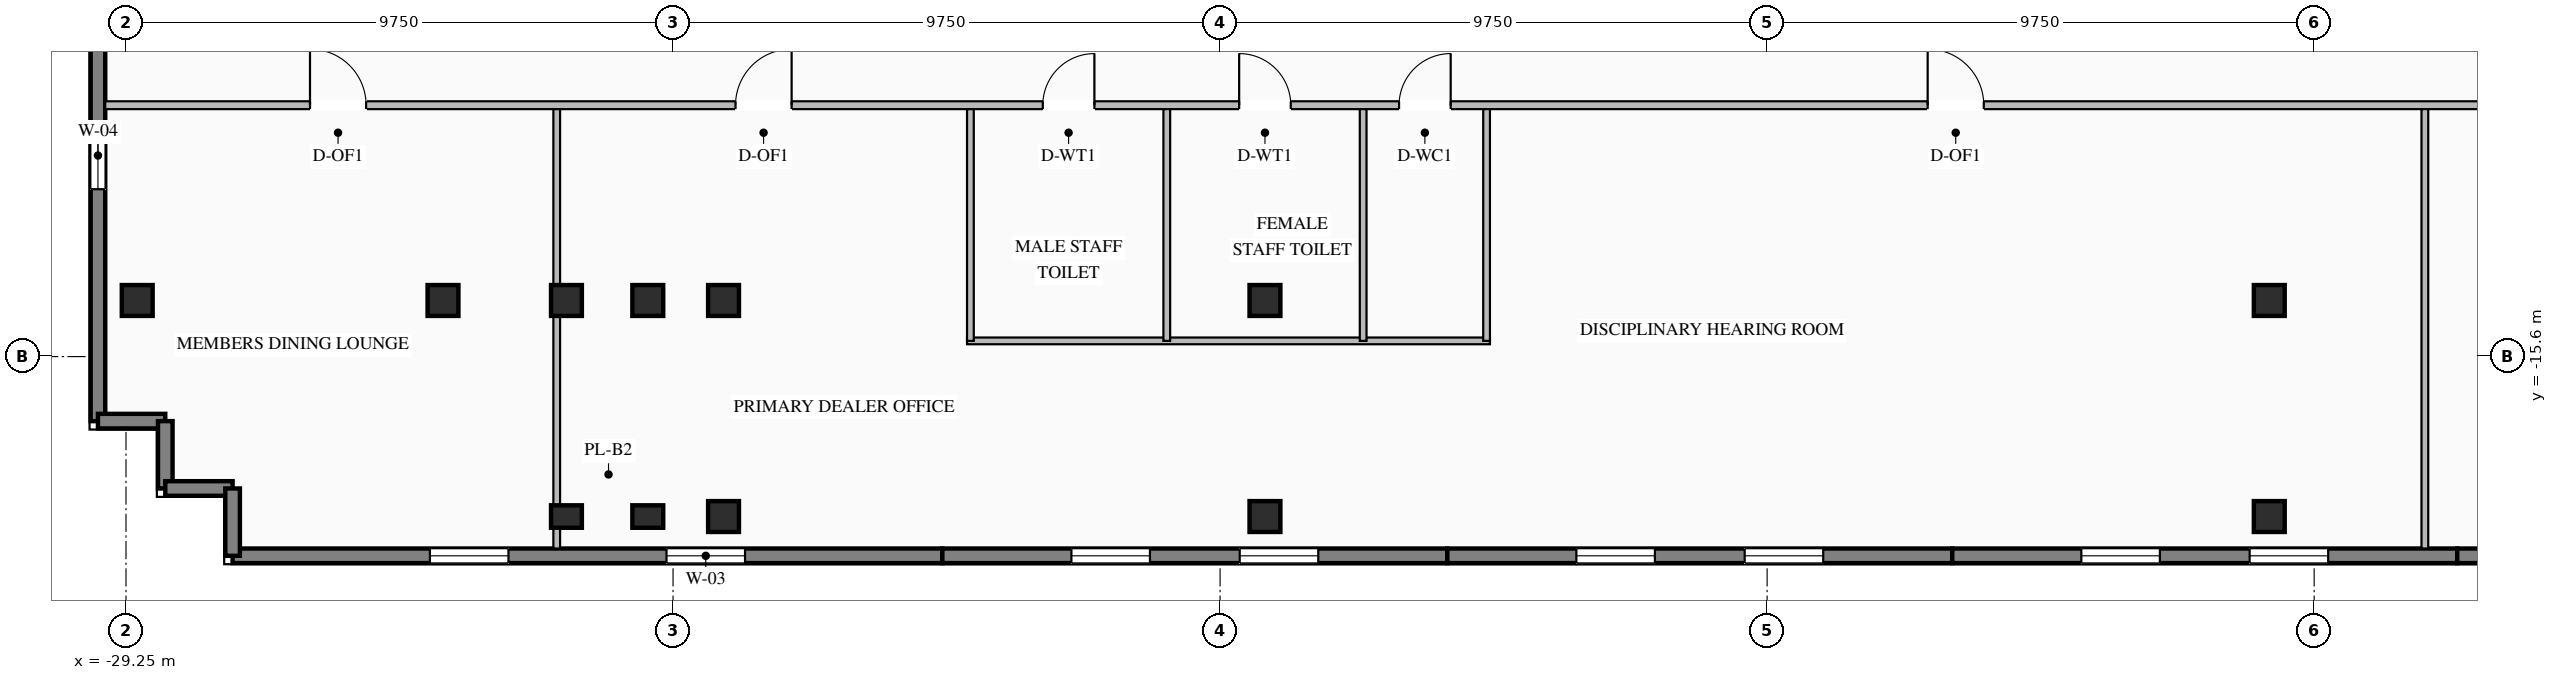
"""IFC4 building model, lengths in metres.
Left out: names, types, materials, properties, quantities, classifications, styles, units other than length and angle.
Written with IfcOpenShell. Run it as: python <this file> out.ifc"""

import sys

from ifc_helpers import new_model, si_unit, direction, frame, frame_2d, origin, origin_2d, place, context, subcontext, project, spatial, rectangle, i_section, extrude, element, fill, save


model = new_model("IFC4")
c1 = context("Model", 3, precision=1e-05, world=origin(), true_north=direction((0.0, 1.0)))
c2 = subcontext(c1, "Body", "Model", "MODEL_VIEW")
j1 = project(units=[si_unit("LENGTHUNIT", "METRE"), si_unit("PLANEANGLEUNIT", "RADIAN")], contexts=[c1])
p1 = place(None, origin())
s1 = spatial("IfcSite", under=j1, at=p1, CompositionType="ELEMENT")
p2 = place(p1, origin())
s2 = spatial("IfcBuilding", under=s1, at=p2, CompositionType="ELEMENT")
p3 = place(p2, frame((0.0, 0.0, 208.5)))
s3 = spatial("IfcBuildingStorey", under=s2, at=p3, CompositionType="ELEMENT", Elevation=208.5)
for number, where, z_axis, x_axis in (
    (1, (-21.4, -14.6, 0.0), (0.0, 0.0, 1.0), (1.0, 0.0, 0.0)),
    (2, (-19.95, -14.6, 0.0), (0.0, 0.0, 1.0), (1.0, 0.0, 0.0)),
    (3, (-18.6, -14.6, 0.0), (0.0, 0.0, 1.0), (1.0, 0.0, 0.0)),
    (4, (-8.95, -14.6, 0.0), (0.0, 0.0, 1.0), (1.0, 0.0, 0.0)),
    (5, (8.95, -14.6, 0.0), (0.0, 0.0, 1.0), (1.0, 0.0, 0.0)),
    (6, (-23.6, -14.6, 0.0), (0.0, 0.0, 1.0), (1.0, 0.0, 0.0)),
    (7, (-18.6, -18.45, 0.0), (0.0, 0.0, 1.0), (1.0, 0.0, 0.0)),
    (8, (-8.95, -18.45, 0.0), (0.0, 0.0, 1.0), (1.0, 0.0, 0.0)),
    (9, (8.95, -18.45, 0.0), (0.0, 0.0, 1.0), (1.0, 0.0, 0.0)),
    (10, (-29.05, -14.6, 0.0), (0.0, 0.0, 1.0), (1.0, 0.0, 0.0)),
):
    element("IfcColumn", number, at=place(p3, frame(where, z_axis=z_axis, x_axis=x_axis)), inside=s3, PredefinedType="COLUMN", context=c2, shape_type="SweptSolid", body=[
        extrude(i_section(OverallWidth=0.55, OverallDepth=0.55, WebThickness=0.024, FlangeThickness=0.036, at=origin_2d()), origin(), (0.0, 0.0, 1.0), 3.45),
    ])
for number, where, z_axis, x_axis in (
    (11, (-21.4, -18.45, 0.0), (0.0, 0.0, 1.0), (1.0, 0.0, 0.0)),
    (12, (-19.95, -18.45, 0.0), (0.0, 0.0, 1.0), (1.0, 0.0, 0.0)),
):
    element("IfcColumn", number, at=place(p3, frame(where, z_axis=z_axis, x_axis=x_axis)), inside=s3, PredefinedType="PILASTER", context=c2, shape_type="SweptSolid", body=[
        extrude(rectangle(XDim=0.55, YDim=0.4, at=origin_2d()), origin(), (0.0, 0.0, 1.0), 3.45),
    ])
p4 = place(p3, frame((-14.7, -19.15, 0.0), z_axis=(0.0, 0.0, 1.0), x_axis=(-1.0, 0.0, 0.0)))
e13 = element("IfcWall", 13, at=p4, inside=s3, PredefinedType="STANDARD", context=c2, shape_type="SweptSolid", body=[
    extrude(rectangle(XDim=12.65, YDim=0.26, at=frame_2d((6.325, 0.0))), origin(), (0.0, 0.0, 1.0), 3.25),
])
p5 = place(p4, frame((3.517, 0.0, 0.76)))
e14 = element("IfcOpeningElement", 14, at=p5, cuts=e13, PredefinedType="OPENING", context=c2, shape_type="SweptSolid", body=[
    extrude(rectangle(XDim=1.4, YDim=1.95, at=frame_2d((0.7, 0.975))), frame((0.0, 0.14, 0.0), z_axis=(0.0, -1.0, 0.0), x_axis=(1.0, 0.0, 0.0)), (0.0, 0.0, 1.0), 0.28),
])
p6 = place(p4, frame((7.733, 0.0, 0.76)))
e15 = element("IfcOpeningElement", 15, at=p6, cuts=e13, PredefinedType="OPENING", context=c2, shape_type="SweptSolid", body=[
    extrude(rectangle(XDim=1.4, YDim=1.95, at=frame_2d((0.7, 0.975))), frame((0.0, 0.14, 0.0), z_axis=(0.0, -1.0, 0.0), x_axis=(1.0, 0.0, 0.0)), (0.0, 0.0, 1.0), 0.28),
])
p7 = place(p3, frame((-5.7, -19.15, 0.0), z_axis=(0.0, 0.0, 1.0), x_axis=(-1.0, 0.0, 0.0)))
e16 = element("IfcWall", 16, at=p7, inside=s3, PredefinedType="STANDARD", context=c2, shape_type="SweptSolid", body=[
    extrude(rectangle(XDim=9.0, YDim=0.26, at=frame_2d((4.5, 0.0))), origin(), (0.0, 0.0, 1.0), 3.25),
])
p8 = place(p7, frame((2.3, 0.0, 0.76)))
e17 = element("IfcOpeningElement", 17, at=p8, cuts=e16, PredefinedType="OPENING", context=c2, shape_type="SweptSolid", body=[
    extrude(rectangle(XDim=1.4, YDim=1.95, at=frame_2d((0.7, 0.975))), frame((0.0, 0.14, 0.0), z_axis=(0.0, -1.0, 0.0), x_axis=(1.0, 0.0, 0.0)), (0.0, 0.0, 1.0), 0.28),
])
p9 = place(p7, frame((5.3, 0.0, 0.76)))
e18 = element("IfcOpeningElement", 18, at=p9, cuts=e16, PredefinedType="OPENING", context=c2, shape_type="SweptSolid", body=[
    extrude(rectangle(XDim=1.4, YDim=1.95, at=frame_2d((0.7, 0.975))), frame((0.0, 0.14, 0.0), z_axis=(0.0, -1.0, 0.0), x_axis=(1.0, 0.0, 0.0)), (0.0, 0.0, 1.0), 0.28),
])
p10 = place(p3, frame((3.3, -19.15, 0.0), z_axis=(0.0, 0.0, 1.0), x_axis=(-1.0, 0.0, 0.0)))
e19 = element("IfcWall", 19, at=p10, inside=s3, PredefinedType="STANDARD", context=c2, shape_type="SweptSolid", body=[
    extrude(rectangle(XDim=9.0, YDim=0.26, at=frame_2d((4.5, 0.0))), origin(), (0.0, 0.0, 1.0), 3.25),
])
p11 = place(p10, frame((2.3, 0.0, 0.76)))
e20 = element("IfcOpeningElement", 20, at=p11, cuts=e19, PredefinedType="OPENING", context=c2, shape_type="SweptSolid", body=[
    extrude(rectangle(XDim=1.4, YDim=1.95, at=frame_2d((0.7, 0.975))), frame((0.0, 0.14, 0.0), z_axis=(0.0, -1.0, 0.0), x_axis=(1.0, 0.0, 0.0)), (0.0, 0.0, 1.0), 0.28),
])
p12 = place(p10, frame((5.3, 0.0, 0.76)))
e21 = element("IfcOpeningElement", 21, at=p12, cuts=e19, PredefinedType="OPENING", context=c2, shape_type="SweptSolid", body=[
    extrude(rectangle(XDim=1.4, YDim=1.95, at=frame_2d((0.7, 0.975))), frame((0.0, 0.14, 0.0), z_axis=(0.0, -1.0, 0.0), x_axis=(1.0, 0.0, 0.0)), (0.0, 0.0, 1.0), 0.28),
])
p13 = place(p3, frame((12.3, -19.15, 0.0), z_axis=(0.0, 0.0, 1.0), x_axis=(-1.0, 0.0, 0.0)))
e22 = element("IfcWall", 22, at=p13, inside=s3, PredefinedType="STANDARD", context=c2, shape_type="SweptSolid", body=[
    extrude(rectangle(XDim=9.0, YDim=0.26, at=frame_2d((4.5, 0.0))), origin(), (0.0, 0.0, 1.0), 3.25),
])
p14 = place(p13, frame((2.3, 0.0, 0.76)))
e23 = element("IfcOpeningElement", 23, at=p14, cuts=e22, PredefinedType="OPENING", context=c2, shape_type="SweptSolid", body=[
    extrude(rectangle(XDim=1.4, YDim=1.95, at=frame_2d((0.7, 0.975))), frame((0.0, 0.14, 0.0), z_axis=(0.0, -1.0, 0.0), x_axis=(1.0, 0.0, 0.0)), (0.0, 0.0, 1.0), 0.28),
])
p15 = place(p13, frame((5.3, 0.0, 0.76)))
e24 = element("IfcOpeningElement", 24, at=p15, cuts=e22, PredefinedType="OPENING", context=c2, shape_type="SweptSolid", body=[
    extrude(rectangle(XDim=1.4, YDim=1.95, at=frame_2d((0.7, 0.975))), frame((0.0, 0.14, 0.0), z_axis=(0.0, -1.0, 0.0), x_axis=(1.0, 0.0, 0.0)), (0.0, 0.0, 1.0), 0.28),
])
p16 = place(p3, frame((24.95, -19.15, 0.0), z_axis=(0.0, 0.0, 1.0), x_axis=(-1.0, 0.0, 0.0)))
e25 = element("IfcWall", 25, at=p16, inside=s3, PredefinedType="STANDARD", context=c2, shape_type="SweptSolid", body=[
    extrude(rectangle(XDim=12.65, YDim=0.26, at=frame_2d((6.325, 0.0))), origin(), (0.0, 0.0, 1.0), 3.25),
])
p17 = place(p16, frame((3.517, 0.0, 0.76)))
e26 = element("IfcOpeningElement", 26, at=p17, cuts=e25, PredefinedType="OPENING", context=c2, shape_type="SweptSolid", body=[
    extrude(rectangle(XDim=1.4, YDim=1.95, at=frame_2d((0.7, 0.975))), frame((0.0, 0.14, 0.0), z_axis=(0.0, -1.0, 0.0), x_axis=(1.0, 0.0, 0.0)), (0.0, 0.0, 1.0), 0.28),
])
p18 = place(p16, frame((7.733, 0.0, 0.76)))
e27 = element("IfcOpeningElement", 27, at=p18, cuts=e25, PredefinedType="OPENING", context=c2, shape_type="SweptSolid", body=[
    extrude(rectangle(XDim=1.4, YDim=1.95, at=frame_2d((0.7, 0.975))), frame((0.0, 0.14, 0.0), z_axis=(0.0, -1.0, 0.0), x_axis=(1.0, 0.0, 0.0)), (0.0, 0.0, 1.0), 0.28),
])
p19 = place(p3, frame((-29.75, -16.75, 0.0), z_axis=(0.0, 0.0, 1.0), x_axis=(0.0, 1.0, 0.0)))
e28 = element("IfcWall", 28, at=p19, inside=s3, PredefinedType="STANDARD", context=c2, shape_type="SweptSolid", body=[
    extrude(rectangle(XDim=15.85, YDim=0.26, at=frame_2d((7.925, 0.0))), origin(), (0.0, 0.0, 1.0), 3.25),
])
p20 = place(p19, frame((4.133, 0.0, 0.76)))
e29 = element("IfcOpeningElement", 29, at=p20, cuts=e28, PredefinedType="OPENING", context=c2, shape_type="SweptSolid", body=[
    extrude(rectangle(XDim=1.2, YDim=1.95, at=frame_2d((0.6, 0.975))), frame((0.0, 0.14, 0.0), z_axis=(0.0, -1.0, 0.0), x_axis=(1.0, 0.0, 0.0)), (0.0, 0.0, 1.0), 0.28),
])
p21 = place(p19, frame((9.967, 0.0, 0.76)))
e30 = element("IfcOpeningElement", 30, at=p21, cuts=e28, PredefinedType="OPENING", context=c2, shape_type="SweptSolid", body=[
    extrude(rectangle(XDim=1.2, YDim=1.95, at=frame_2d((0.6, 0.975))), frame((0.0, 0.14, 0.0), z_axis=(0.0, -1.0, 0.0), x_axis=(1.0, 0.0, 0.0)), (0.0, 0.0, 1.0), 0.28),
])
for number, where, z_axis, x_axis in (
    (31, (-29.75, -16.75, 0.0), (0.0, 0.0, 1.0), (1.0, 0.0, 0.0)),
    (32, (-28.55, -16.75, 0.0), (0.0, 0.0, 1.0), (0.0, -1.0, 0.0)),
    (33, (-28.55, -17.95, 0.0), (0.0, 0.0, 1.0), (1.0, 0.0, 0.0)),
    (34, (-27.35, -17.95, 0.0), (0.0, 0.0, 1.0), (0.0, -1.0, 0.0)),
):
    element("IfcWall", number, at=place(p3, frame(where, z_axis=z_axis, x_axis=x_axis)), inside=s3, PredefinedType="STANDARD", context=c2, shape_type="SweptSolid", body=[
        extrude(rectangle(XDim=1.2, YDim=0.26, at=frame_2d((0.6, 0.0))), origin(), (0.0, 0.0, 1.0), 3.25),
    ])
p22 = place(p3, frame((-29.62, -11.12, 0.0), z_axis=(0.0, 0.0, 1.0), x_axis=(1.0, 0.0, 0.0)))
e35 = element("IfcWall", 35, at=p22, inside=s3, PredefinedType="STANDARD", context=c2, shape_type="SweptSolid", body=[
    extrude(rectangle(XDim=56.84, YDim=0.14, at=frame_2d((28.42, 0.0))), origin(), (0.0, 0.0, 1.0), 3.25),
])
p23 = place(p22, frame((16.71, 0.0, 0.0)))
e36 = element("IfcOpeningElement", 36, at=p23, cuts=e35, PredefinedType="OPENING", context=c2, shape_type="SweptSolid", body=[
    extrude(rectangle(XDim=0.92, YDim=2.08, at=frame_2d((0.46, 1.04))), frame((0.0, 0.08, 0.0), z_axis=(0.0, -1.0, 0.0), x_axis=(1.0, 0.0, 0.0)), (0.0, 0.0, 1.0), 0.16),
])
p24 = place(p22, frame((20.21, 0.0, 0.0)))
e37 = element("IfcOpeningElement", 37, at=p24, cuts=e35, PredefinedType="OPENING", context=c2, shape_type="SweptSolid", body=[
    extrude(rectangle(XDim=0.92, YDim=2.08, at=frame_2d((0.46, 1.04))), frame((0.0, 0.08, 0.0), z_axis=(0.0, -1.0, 0.0), x_axis=(1.0, 0.0, 0.0)), (0.0, 0.0, 1.0), 0.16),
])
p25 = place(p22, frame((23.06, 0.0, 0.0)))
e38 = element("IfcOpeningElement", 38, at=p25, cuts=e35, PredefinedType="OPENING", context=c2, shape_type="SweptSolid", body=[
    extrude(rectangle(XDim=0.92, YDim=2.08, at=frame_2d((0.46, 1.04))), frame((0.0, 0.08, 0.0), z_axis=(0.0, -1.0, 0.0), x_axis=(1.0, 0.0, 0.0)), (0.0, 0.0, 1.0), 0.16),
])
p26 = place(p22, frame((3.649, 0.0, 0.0)))
e39 = element("IfcOpeningElement", 39, at=p26, cuts=e35, PredefinedType="OPENING", context=c2, shape_type="SweptSolid", body=[
    extrude(rectangle(XDim=1.0, YDim=2.08, at=frame_2d((0.5, 1.04))), frame((0.0, 0.08, 0.0), z_axis=(0.0, -1.0, 0.0), x_axis=(1.0, 0.0, 0.0)), (0.0, 0.0, 1.0), 0.16),
])
p27 = place(p22, frame((11.233, 0.0, 0.0)))
e40 = element("IfcOpeningElement", 40, at=p27, cuts=e35, PredefinedType="OPENING", context=c2, shape_type="SweptSolid", body=[
    extrude(rectangle(XDim=1.0, YDim=2.08, at=frame_2d((0.5, 1.04))), frame((0.0, 0.08, 0.0), z_axis=(0.0, -1.0, 0.0), x_axis=(1.0, 0.0, 0.0)), (0.0, 0.0, 1.0), 0.16),
])
p28 = place(p22, frame((32.481, 0.0, 0.0)))
e41 = element("IfcOpeningElement", 41, at=p28, cuts=e35, PredefinedType="OPENING", context=c2, shape_type="SweptSolid", body=[
    extrude(rectangle(XDim=1.0, YDim=2.08, at=frame_2d((0.5, 1.04))), frame((0.0, 0.08, 0.0), z_axis=(0.0, -1.0, 0.0), x_axis=(1.0, 0.0, 0.0)), (0.0, 0.0, 1.0), 0.16),
])
p29 = place(p22, frame((48.466, 0.0, 0.0)))
e42 = element("IfcOpeningElement", 42, at=p29, cuts=e35, PredefinedType="OPENING", context=c2, shape_type="SweptSolid", body=[
    extrude(rectangle(XDim=1.0, YDim=2.08, at=frame_2d((0.5, 1.04))), frame((0.0, 0.08, 0.0), z_axis=(0.0, -1.0, 0.0), x_axis=(1.0, 0.0, 0.0)), (0.0, 0.0, 1.0), 0.16),
])
p30 = place(p3, frame((-14.26, -15.32, 0.0), z_axis=(0.0, 0.0, 1.0), x_axis=(1.0, 0.0, 0.0)))
e43 = element("IfcWall", 43, at=p30, inside=s3, PredefinedType="STANDARD", context=c2, shape_type="SweptSolid", body=[
    extrude(rectangle(XDim=9.32, YDim=0.12, at=frame_2d((4.66, 0.0))), origin(), (0.0, 0.0, 1.0), 3.25),
])
for number, where, z_axis, x_axis in (
    (44, (-14.2, -15.32, 0.0), (0.0, 0.0, 1.0), (0.0, 1.0, 0.0)),
    (45, (-10.7, -15.32, 0.0), (0.0, 0.0, 1.0), (0.0, 1.0, 0.0)),
    (46, (-7.2, -15.32, 0.0), (0.0, 0.0, 1.0), (0.0, 1.0, 0.0)),
    (47, (-5.0, -15.32, 0.0), (0.0, 0.0, 1.0), (0.0, 1.0, 0.0)),
):
    element("IfcWall", number, at=place(p3, frame(where, z_axis=z_axis, x_axis=x_axis)), inside=s3, PredefinedType="STANDARD", context=c2, shape_type="SweptSolid", body=[
        extrude(rectangle(XDim=4.13, YDim=0.12, at=frame_2d((2.065, 0.0))), origin(), (0.0, 0.0, 1.0), 3.25),
    ])
p31 = place(p3, frame((-21.573, -19.02, 0.0), z_axis=(0.0, 0.0, 1.0), x_axis=(0.0, 1.0, 0.0)))
e48 = element("IfcWall", 48, at=p31, inside=s3, PredefinedType="STANDARD", context=c2, shape_type="SweptSolid", body=[
    extrude(rectangle(XDim=7.83, YDim=0.12, at=frame_2d((3.915, 0.0))), origin(), (0.0, 0.0, 1.0), 2.645),
])
p32 = place(p3, frame((11.723, -19.02, 0.0), z_axis=(0.0, 0.0, 1.0), x_axis=(0.0, 1.0, 0.0)))
e49 = element("IfcWall", 49, at=p32, inside=s3, PredefinedType="STANDARD", context=c2, shape_type="SweptSolid", body=[
    extrude(rectangle(XDim=7.83, YDim=0.12, at=frame_2d((3.915, 0.0))), origin(), (0.0, 0.0, 1.0), 3.25),
])
p33 = place(p5, origin())
e50 = element("IfcWindow", 50, at=p33, inside=s3, PartitioningType="SINGLE_PANEL", PredefinedType="WINDOW", context=c2, shape_type="SweptSolid", body=[
    extrude(rectangle(XDim=1.4, YDim=1.95, at=frame_2d((0.7, 0.975))), frame((0.0, 0.03, 0.0), z_axis=(0.0, -1.0, 0.0), x_axis=(1.0, 0.0, 0.0)), (0.0, 0.0, 1.0), 0.06),
])
fill(e14, e50)
p34 = place(p6, origin())
e51 = element("IfcWindow", 51, at=p34, inside=s3, PartitioningType="SINGLE_PANEL", PredefinedType="WINDOW", context=c2, shape_type="SweptSolid", body=[
    extrude(rectangle(XDim=1.4, YDim=1.95, at=frame_2d((0.7, 0.975))), frame((0.0, 0.03, 0.0), z_axis=(0.0, -1.0, 0.0), x_axis=(1.0, 0.0, 0.0)), (0.0, 0.0, 1.0), 0.06),
])
fill(e15, e51)
p35 = place(p8, origin())
e52 = element("IfcWindow", 52, at=p35, inside=s3, PartitioningType="SINGLE_PANEL", PredefinedType="WINDOW", context=c2, shape_type="SweptSolid", body=[
    extrude(rectangle(XDim=1.4, YDim=1.95, at=frame_2d((0.7, 0.975))), frame((0.0, 0.03, 0.0), z_axis=(0.0, -1.0, 0.0), x_axis=(1.0, 0.0, 0.0)), (0.0, 0.0, 1.0), 0.06),
])
fill(e17, e52)
p36 = place(p9, origin())
e53 = element("IfcWindow", 53, at=p36, inside=s3, PartitioningType="SINGLE_PANEL", PredefinedType="WINDOW", context=c2, shape_type="SweptSolid", body=[
    extrude(rectangle(XDim=1.4, YDim=1.95, at=frame_2d((0.7, 0.975))), frame((0.0, 0.03, 0.0), z_axis=(0.0, -1.0, 0.0), x_axis=(1.0, 0.0, 0.0)), (0.0, 0.0, 1.0), 0.06),
])
fill(e18, e53)
p37 = place(p11, origin())
e54 = element("IfcWindow", 54, at=p37, inside=s3, PartitioningType="SINGLE_PANEL", PredefinedType="WINDOW", context=c2, shape_type="SweptSolid", body=[
    extrude(rectangle(XDim=1.4, YDim=1.95, at=frame_2d((0.7, 0.975))), frame((0.0, 0.03, 0.0), z_axis=(0.0, -1.0, 0.0), x_axis=(1.0, 0.0, 0.0)), (0.0, 0.0, 1.0), 0.06),
])
fill(e20, e54)
p38 = place(p12, origin())
e55 = element("IfcWindow", 55, at=p38, inside=s3, PartitioningType="SINGLE_PANEL", PredefinedType="WINDOW", context=c2, shape_type="SweptSolid", body=[
    extrude(rectangle(XDim=1.4, YDim=1.95, at=frame_2d((0.7, 0.975))), frame((0.0, 0.03, 0.0), z_axis=(0.0, -1.0, 0.0), x_axis=(1.0, 0.0, 0.0)), (0.0, 0.0, 1.0), 0.06),
])
fill(e21, e55)
p39 = place(p14, origin())
e56 = element("IfcWindow", 56, at=p39, inside=s3, PartitioningType="SINGLE_PANEL", PredefinedType="WINDOW", context=c2, shape_type="SweptSolid", body=[
    extrude(rectangle(XDim=1.4, YDim=1.95, at=frame_2d((0.7, 0.975))), frame((0.0, 0.03, 0.0), z_axis=(0.0, -1.0, 0.0), x_axis=(1.0, 0.0, 0.0)), (0.0, 0.0, 1.0), 0.06),
])
fill(e23, e56)
p40 = place(p15, origin())
e57 = element("IfcWindow", 57, at=p40, inside=s3, PartitioningType="SINGLE_PANEL", PredefinedType="WINDOW", context=c2, shape_type="SweptSolid", body=[
    extrude(rectangle(XDim=1.4, YDim=1.95, at=frame_2d((0.7, 0.975))), frame((0.0, 0.03, 0.0), z_axis=(0.0, -1.0, 0.0), x_axis=(1.0, 0.0, 0.0)), (0.0, 0.0, 1.0), 0.06),
])
fill(e24, e57)
p41 = place(p20, origin())
e58 = element("IfcWindow", 58, at=p41, inside=s3, PartitioningType="SINGLE_PANEL", PredefinedType="WINDOW", context=c2, shape_type="SweptSolid", body=[
    extrude(rectangle(XDim=1.2, YDim=1.95, at=frame_2d((0.6, 0.975))), frame((0.0, 0.03, 0.0), z_axis=(0.0, -1.0, 0.0), x_axis=(1.0, 0.0, 0.0)), (0.0, 0.0, 1.0), 0.06),
])
fill(e29, e58)
p42 = place(p23, origin())
e59 = element("IfcDoor", 59, at=p42, inside=s3, OperationType="SINGLE_SWING_RIGHT", PredefinedType="DOOR", context=c2, shape_type="SweptSolid", body=[
    extrude(rectangle(XDim=0.92, YDim=2.08, at=frame_2d((0.46, 1.04))), frame((0.0, 0.025, 0.0), z_axis=(0.0, -1.0, 0.0), x_axis=(1.0, 0.0, 0.0)), (0.0, 0.0, 1.0), 0.05),
])
fill(e36, e59)
p43 = place(p24, origin())
e60 = element("IfcDoor", 60, at=p43, inside=s3, OperationType="SINGLE_SWING_LEFT", PredefinedType="DOOR", context=c2, shape_type="SweptSolid", body=[
    extrude(rectangle(XDim=0.92, YDim=2.08, at=frame_2d((0.46, 1.04))), frame((0.0, 0.025, 0.0), z_axis=(0.0, -1.0, 0.0), x_axis=(1.0, 0.0, 0.0)), (0.0, 0.0, 1.0), 0.05),
])
fill(e37, e60)
p44 = place(p25, origin())
e61 = element("IfcDoor", 61, at=p44, inside=s3, OperationType="SINGLE_SWING_RIGHT", PredefinedType="DOOR", context=c2, shape_type="SweptSolid", body=[
    extrude(rectangle(XDim=0.92, YDim=2.08, at=frame_2d((0.46, 1.04))), frame((0.0, 0.025, 0.0), z_axis=(0.0, -1.0, 0.0), x_axis=(1.0, 0.0, 0.0)), (0.0, 0.0, 1.0), 0.05),
])
fill(e38, e61)
p45 = place(p26, origin())
e62 = element("IfcDoor", 62, at=p45, inside=s3, OperationType="SINGLE_SWING_LEFT", PredefinedType="DOOR", context=c2, shape_type="SweptSolid", body=[
    extrude(rectangle(XDim=1.0, YDim=2.08, at=frame_2d((0.5, 1.04))), frame((0.0, 0.025, 0.0), z_axis=(0.0, -1.0, 0.0), x_axis=(1.0, 0.0, 0.0)), (0.0, 0.0, 1.0), 0.05),
])
fill(e39, e62)
p46 = place(p27, origin())
e63 = element("IfcDoor", 63, at=p46, inside=s3, OperationType="SINGLE_SWING_RIGHT", PredefinedType="DOOR", context=c2, shape_type="SweptSolid", body=[
    extrude(rectangle(XDim=1.0, YDim=2.08, at=frame_2d((0.5, 1.04))), frame((0.0, 0.025, 0.0), z_axis=(0.0, -1.0, 0.0), x_axis=(1.0, 0.0, 0.0)), (0.0, 0.0, 1.0), 0.05),
])
fill(e40, e63)
p47 = place(p28, origin())
e64 = element("IfcDoor", 64, at=p47, inside=s3, OperationType="SINGLE_SWING_LEFT", PredefinedType="DOOR", context=c2, shape_type="SweptSolid", body=[
    extrude(rectangle(XDim=1.0, YDim=2.08, at=frame_2d((0.5, 1.04))), frame((0.0, 0.025, 0.0), z_axis=(0.0, -1.0, 0.0), x_axis=(1.0, 0.0, 0.0)), (0.0, 0.0, 1.0), 0.05),
])
fill(e41, e64)
save(model, sys.argv[1])
